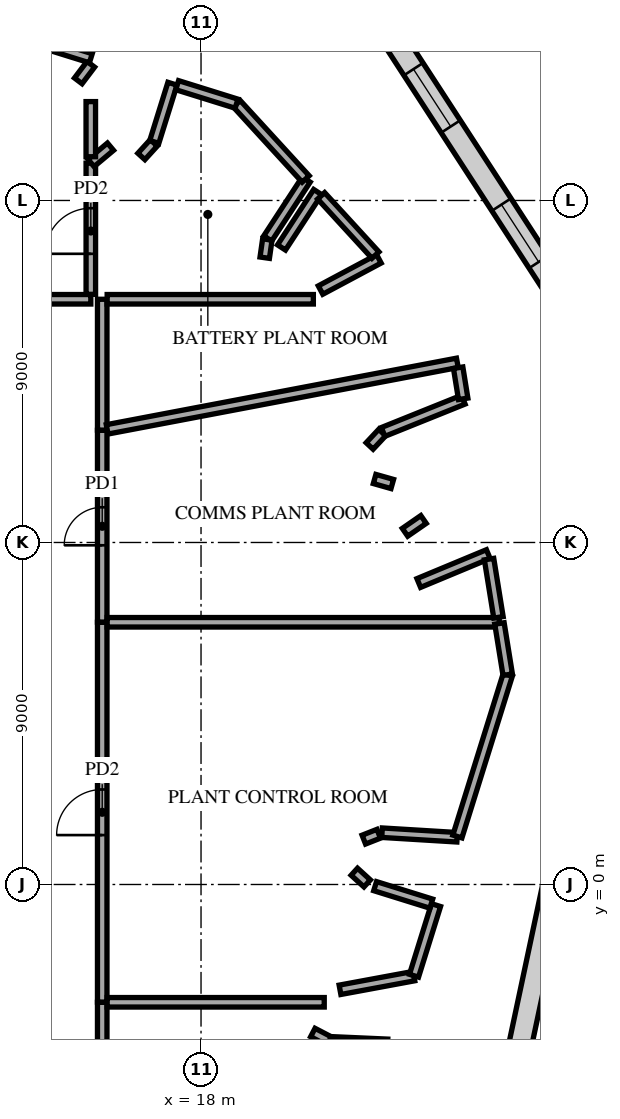
"""IFC4 building model, lengths in metres.
Left out: names, types, materials, properties, quantities, classifications, styles, units other than length and angle.
Written with IfcOpenShell. Run it as: python <this file> out.ifc"""

import sys

from ifc_helpers import new_model, si_unit, direction, frame, frame_2d, origin, place, context, subcontext, project, spatial, rectangle, extrude, element, fill, save


model = new_model("IFC4")
c1 = context("Model", 3, precision=1e-05, world=origin(), true_north=direction((0.0, 1.0)))
c2 = subcontext(c1, "Body", "Model", "MODEL_VIEW")
j1 = project(units=[si_unit("LENGTHUNIT", "METRE"), si_unit("PLANEANGLEUNIT", "RADIAN")], contexts=[c1])
p1 = place(None, origin())
s1 = spatial("IfcSite", under=j1, at=p1, CompositionType="ELEMENT")
p2 = place(p1, origin())
s2 = spatial("IfcBuilding", under=s1, at=p2, CompositionType="ELEMENT")
p3 = place(p2, frame((0.0, 0.0, 344.5)))
s3 = spatial("IfcBuildingStorey", under=s2, at=p3, CompositionType="ELEMENT", Elevation=344.5)
p4 = place(p3, frame((15.4, -13.095, 0.0), z_axis=(0.0, 0.0, 1.0), x_axis=(0.0, 1.0, 0.0)))
e1 = element("IfcWall", 1, at=p4, inside=s3, PredefinedType="PARTITIONING", context=c2, shape_type="SweptSolid", body=[
    extrude(rectangle(XDim=9.995, YDim=0.25, at=frame_2d((4.998, 0.0))), origin(), (0.0, 0.0, 1.0), 5.3),
])
p5 = place(p4, frame((4.395, 0.0, 0.0)))
e2 = element("IfcOpeningElement", 2, at=p5, cuts=e1, PredefinedType="OPENING", context=c2, shape_type="SweptSolid", body=[
    extrude(rectangle(XDim=1.2, YDim=2.1, at=frame_2d((0.6, 1.05))), frame((0.0, 0.135, 0.0), z_axis=(0.0, -1.0, 0.0), x_axis=(1.0, 0.0, 0.0)), (0.0, 0.0, 1.0), 0.27),
])
p6 = place(p3, frame((21.399, -4.127, 0.0), z_axis=(0.0, 0.0, 1.0), x_axis=(0.999019848314, -0.044264462878, 0.0)))
e3 = element("IfcWall", 3, at=p6, inside=s3, PredefinedType="PARTITIONING", context=c2, shape_type="SweptSolid", body=[
    extrude(rectangle(XDim=1.511, YDim=0.25, at=frame_2d((0.756, 0.0))), origin(), (0.0, 0.0, 1.0), 5.3),
])
p7 = place(p3, frame((20.942, -3.896, 0.0), z_axis=(0.0, 0.0, 1.0), x_axis=(0.886728784224, -0.462290020688, 0.0)))
e4 = element("IfcWall", 4, at=p7, inside=s3, PredefinedType="PARTITIONING", context=c2, shape_type="SweptSolid", body=[
    extrude(rectangle(XDim=0.484, YDim=0.25, at=frame_2d((0.242, 0.0))), origin(), (0.0, 0.0, 1.0), 5.3),
])
p8 = place(p3, frame((15.4, -3.095, 0.0), z_axis=(0.0, 0.0, 1.0), x_axis=(0.0, 1.0, 0.0)))
e5 = element("IfcWall", 5, at=p8, inside=s3, PredefinedType="PARTITIONING", context=c2, shape_type="SweptSolid", body=[
    extrude(rectangle(XDim=9.995, YDim=0.25, at=frame_2d((4.998, 0.0))), origin(), (0.0, 0.0, 1.0), 5.3),
])
p9 = place(p8, frame((4.395, 0.0, 0.0)))
e6 = element("IfcOpeningElement", 6, at=p9, cuts=e5, PredefinedType="OPENING", context=c2, shape_type="SweptSolid", body=[
    extrude(rectangle(XDim=1.2, YDim=2.1, at=frame_2d((0.6, 1.05))), frame((0.0, 0.135, 0.0), z_axis=(0.0, -1.0, 0.0), x_axis=(1.0, 0.0, 0.0)), (0.0, 0.0, 1.0), 0.27),
])
p10 = place(p3, frame((15.53, -3.1, 0.0), z_axis=(0.0, 0.0, 1.0), x_axis=(1.0, 0.0, 0.0)))
e7 = element("IfcWall", 7, at=p10, inside=s3, PredefinedType="PARTITIONING", context=c2, shape_type="SweptSolid", body=[
    extrude(rectangle(XDim=5.712, YDim=0.25, at=frame_2d((2.856, 0.0))), origin(), (0.0, 0.0, 1.0), 4.466),
])
p11 = place(p3, frame((21.657, -2.771, 0.0), z_axis=(0.0, 0.0, 1.0), x_axis=(0.98324759297, 0.182274987092, 0.0)))
e8 = element("IfcWall", 8, at=p11, inside=s3, PredefinedType="PARTITIONING", context=c2, shape_type="SweptSolid", body=[
    extrude(rectangle(XDim=1.977, YDim=0.25, at=frame_2d((0.989, 0.0))), origin(), (0.0, 0.0, 1.0), 5.3),
])
p12 = place(p3, frame((23.604, -2.401, 0.0), z_axis=(0.0, 0.0, 1.0), x_axis=(0.297539238937, 0.954709590029, 0.0)))
e9 = element("IfcWall", 9, at=p12, inside=s3, PredefinedType="PARTITIONING", context=c2, shape_type="SweptSolid", body=[
    extrude(rectangle(XDim=1.946, YDim=0.25, at=frame_2d((0.973, 0.0))), origin(), (0.0, 0.0, 1.0), 5.3),
])
p13 = place(p3, frame((22.581, -0.044, 0.0), z_axis=(0.0, 0.0, 1.0), x_axis=(0.95474338111, -0.297430792331, 0.0)))
e10 = element("IfcWall", 10, at=p13, inside=s3, PredefinedType="PARTITIONING", context=c2, shape_type="SweptSolid", body=[
    extrude(rectangle(XDim=1.548, YDim=0.25, at=frame_2d((0.774, 0.0))), origin(), (0.0, 0.0, 1.0), 5.3),
])
p14 = place(p3, frame((22.034, 0.336, 0.0), z_axis=(0.0, 0.0, 1.0), x_axis=(0.739480209933, -0.673178296678, 0.0)))
e11 = element("IfcWall", 11, at=p14, inside=s3, PredefinedType="PARTITIONING", context=c2, shape_type="SweptSolid", body=[
    extrude(rectangle(XDim=0.457, YDim=0.25, at=frame_2d((0.228, 0.0))), origin(), (0.0, 0.0, 1.0), 5.3),
])
p15 = place(p3, frame((22.763, 1.363, 0.0), z_axis=(0.0, 0.0, 1.0), x_axis=(0.998159010361, -0.060651381141, 0.0)))
e12 = element("IfcWall", 12, at=p15, inside=s3, PredefinedType="PARTITIONING", context=c2, shape_type="SweptSolid", body=[
    extrude(rectangle(XDim=1.98, YDim=0.25, at=frame_2d((0.99, 0.0))), origin(), (0.0, 0.0, 1.0), 5.3),
])
p16 = place(p3, frame((22.284, 1.181, 0.0), z_axis=(0.0, 0.0, 1.0), x_axis=(0.930306402857, 0.366783310421, 0.0)))
e13 = element("IfcWall", 13, at=p16, inside=s3, PredefinedType="PARTITIONING", context=c2, shape_type="SweptSolid", body=[
    extrude(rectangle(XDim=0.421, YDim=0.25, at=frame_2d((0.21, 0.0))), origin(), (0.0, 0.0, 1.0), 5.3),
])
p17 = place(p3, frame((24.746, 1.263, 0.0), z_axis=(0.0, 0.0, 1.0), x_axis=(0.297504056883, 0.954720553952, 0.0)))
e14 = element("IfcWall", 14, at=p17, inside=s3, PredefinedType="PARTITIONING", context=c2, shape_type="SweptSolid", body=[
    extrude(rectangle(XDim=4.454, YDim=0.25, at=frame_2d((2.227, 0.0))), origin(), (0.0, 0.0, 1.0), 5.3),
])
p18 = place(p3, frame((15.4, 6.905, 0.0), z_axis=(0.0, 0.0, 1.0), x_axis=(0.0, 1.0, 0.0)))
e15 = element("IfcWall", 15, at=p18, inside=s3, PredefinedType="PARTITIONING", context=c2, shape_type="SweptSolid", body=[
    extrude(rectangle(XDim=5.047, YDim=0.25, at=frame_2d((2.523, 0.0))), origin(), (0.0, 0.0, 1.0), 5.3),
])
p19 = place(p18, frame((2.021, 0.0, 0.0)))
e16 = element("IfcOpeningElement", 16, at=p19, cuts=e15, PredefinedType="OPENING", context=c2, shape_type="SweptSolid", body=[
    extrude(rectangle(XDim=1.0, YDim=2.1, at=frame_2d((0.5, 1.05))), frame((0.0, 0.135, 0.0), z_axis=(0.0, -1.0, 0.0), x_axis=(1.0, 0.0, 0.0)), (0.0, 0.0, 1.0), 0.27),
])
p20 = place(p3, frame((15.53, 6.9, 0.0), z_axis=(0.0, 0.0, 1.0), x_axis=(1.0, 0.0, 0.0)))
e17 = element("IfcWall", 17, at=p20, inside=s3, PredefinedType="PARTITIONING", context=c2, shape_type="SweptSolid", body=[
    extrude(rectangle(XDim=10.317, YDim=0.25, at=frame_2d((5.159, 0.0))), origin(), (0.0, 0.0, 1.0), 4.466),
])
p21 = place(p3, frame((25.852, 6.869, 0.0), z_axis=(0.0, 0.0, 1.0), x_axis=(0.159468506088, -0.987203016388, 0.0)))
e18 = element("IfcWall", 18, at=p21, inside=s3, PredefinedType="PARTITIONING", context=c2, shape_type="SweptSolid", body=[
    extrude(rectangle(XDim=1.366, YDim=0.25, at=frame_2d((0.683, 0.0))), origin(), (0.0, 0.0, 1.0), 5.3),
])
p22 = place(p3, frame((23.729, 7.933, 0.0), z_axis=(0.0, 0.0, 1.0), x_axis=(0.923226391298, 0.384256464371, 0.0)))
e19 = element("IfcWall", 19, at=p22, inside=s3, PredefinedType="PARTITIONING", context=c2, shape_type="SweptSolid", body=[
    extrude(rectangle(XDim=1.98, YDim=0.25, at=frame_2d((0.99, 0.0))), origin(), (0.0, 0.0, 1.0), 5.3),
])
p23 = place(p3, frame((25.579, 8.562, 0.0), z_axis=(0.0, 0.0, 1.0), x_axis=(0.159346186049, -0.987222767663, 0.0)))
e20 = element("IfcWall", 20, at=p23, inside=s3, PredefinedType="PARTITIONING", context=c2, shape_type="SweptSolid", body=[
    extrude(rectangle(XDim=1.552, YDim=0.25, at=frame_2d((0.776, 0.0))), origin(), (0.0, 0.0, 1.0), 5.3),
])
p24 = place(p3, frame((23.367, 9.268, 0.0), z_axis=(0.0, 0.0, 1.0), x_axis=(0.822355310526, 0.568974290499, 0.0)))
e21 = element("IfcWall", 21, at=p24, inside=s3, PredefinedType="PARTITIONING", context=c2, shape_type="SweptSolid", body=[
    extrude(rectangle(XDim=0.593, YDim=0.25, at=frame_2d((0.296, 0.0))), origin(), (0.0, 0.0, 1.0), 5.3),
])
p25 = place(p3, frame((22.567, 10.671, 0.0), z_axis=(0.0, 0.0, 1.0), x_axis=(0.961998655506, -0.273054182911, 0.0)))
e22 = element("IfcWall", 22, at=p25, inside=s3, PredefinedType="PARTITIONING", context=c2, shape_type="SweptSolid", body=[
    extrude(rectangle(XDim=0.484, YDim=0.25, at=frame_2d((0.242, 0.0))), origin(), (0.0, 0.0, 1.0), 5.3),
])
p26 = place(p3, frame((22.437, 11.539, 0.0), z_axis=(0.0, 0.0, 1.0), x_axis=(0.683252613889, 0.730182077029, 0.0)))
e23 = element("IfcWall", 23, at=p26, inside=s3, PredefinedType="PARTITIONING", context=c2, shape_type="SweptSolid", body=[
    extrude(rectangle(XDim=0.484, YDim=0.25, at=frame_2d((0.242, 0.0))), origin(), (0.0, 0.0, 1.0), 5.3),
])
p27 = place(p3, frame((15.4, 11.957, 0.0), z_axis=(0.0, 0.0, 1.0), x_axis=(0.0, 1.0, 0.0)))
e24 = element("IfcWall", 24, at=p27, inside=s3, PredefinedType="PARTITIONING", context=c2, shape_type="SweptSolid", body=[
    extrude(rectangle(XDim=3.443, YDim=0.25, at=frame_2d((1.721, 0.0))), origin(), (0.0, 0.0, 1.0), 4.56),
])
p28 = place(p3, frame((15.53, 11.977, 0.0), z_axis=(0.0, 0.0, 1.0), x_axis=(0.982431849139, 0.186621707732, 0.0)))
e25 = element("IfcWall", 25, at=p28, inside=s3, PredefinedType="PARTITIONING", context=c2, shape_type="SweptSolid", body=[
    extrude(rectangle(XDim=9.38, YDim=0.25, at=frame_2d((4.69, 0.0))), origin(), (0.0, 0.0, 1.0), 4.466),
])
p29 = place(p3, frame((22.792, 11.909, 0.0), z_axis=(0.0, 0.0, 1.0), x_axis=(0.927742008142, 0.373222140728, 0.0)))
e26 = element("IfcWall", 26, at=p29, inside=s3, PredefinedType="PARTITIONING", context=c2, shape_type="SweptSolid", body=[
    extrude(rectangle(XDim=2.274, YDim=0.25, at=frame_2d((1.137, 0.0))), origin(), (0.0, 0.0, 1.0), 5.3),
])
p30 = place(p3, frame((24.766, 13.599, 0.0), z_axis=(0.0, 0.0, 1.0), x_axis=(0.159528555864, -0.987193314333, 0.0)))
e27 = element("IfcWall", 27, at=p30, inside=s3, PredefinedType="PARTITIONING", context=c2, shape_type="SweptSolid", body=[
    extrude(rectangle(XDim=0.83, YDim=0.25, at=frame_2d((0.415, 0.0))), origin(), (0.0, 0.0, 1.0), 5.3),
])
p31 = place(p3, frame((5.105, 15.4, 0.0), z_axis=(0.0, 0.0, 1.0), x_axis=(1.0, 0.0, 0.0)))
e28 = element("IfcWall", 28, at=p31, inside=s3, PredefinedType="PARTITIONING", context=c2, shape_type="SweptSolid", body=[
    extrude(rectangle(XDim=9.995, YDim=0.25, at=frame_2d((4.998, 0.0))), origin(), (0.0, 0.0, 1.0), 5.3),
])
p32 = place(p31, frame((4.395, 0.0, 0.0)))
e29 = element("IfcOpeningElement", 29, at=p32, cuts=e28, PredefinedType="OPENING", context=c2, shape_type="SweptSolid", body=[
    extrude(rectangle(XDim=1.2, YDim=2.1, at=frame_2d((0.6, 1.05))), frame((0.0, 0.135, 0.0), z_axis=(0.0, -1.0, 0.0), x_axis=(1.0, 0.0, 0.0)), (0.0, 0.0, 1.0), 0.27),
])
p33 = place(p3, frame((15.1, 15.53, 0.0), z_axis=(0.0, 0.0, 1.0), x_axis=(0.0, 1.0, 0.0)))
e30 = element("IfcWall", 30, at=p33, inside=s3, PredefinedType="PARTITIONING", context=c2, shape_type="SweptSolid", body=[
    extrude(rectangle(XDim=3.452, YDim=0.25, at=frame_2d((1.726, 0.0))), origin(), (0.0, 0.0, 1.0), 4.466),
])
p34 = place(p33, frame((1.066, 0.0, 0.0)))
e31 = element("IfcOpeningElement", 31, at=p34, cuts=e30, PredefinedType="OPENING", context=c2, shape_type="SweptSolid", body=[
    extrude(rectangle(XDim=1.2, YDim=2.1, at=frame_2d((0.6, 1.05))), frame((0.0, 0.135, 0.0), z_axis=(0.0, -1.0, 0.0), x_axis=(1.0, 0.0, 0.0)), (0.0, 0.0, 1.0), 0.27),
])
p35 = place(p3, frame((15.53, 15.4, 0.0), z_axis=(0.0, 0.0, 1.0), x_axis=(1.0, 0.0, 0.0)))
e32 = element("IfcWall", 32, at=p35, inside=s3, PredefinedType="PARTITIONING", context=c2, shape_type="SweptSolid", body=[
    extrude(rectangle(XDim=5.426, YDim=0.25, at=frame_2d((2.713, 0.0))), origin(), (0.0, 0.0, 1.0), 4.466),
])
p36 = place(p3, frame((21.145, 15.642, 0.0), z_axis=(0.0, 0.0, 1.0), x_axis=(0.8818361721, 0.471555898676, 0.0)))
e33 = element("IfcWall", 33, at=p36, inside=s3, PredefinedType="PARTITIONING", context=c2, shape_type="SweptSolid", body=[
    extrude(rectangle(XDim=1.741, YDim=0.25, at=frame_2d((0.871, 0.0))), origin(), (0.0, 0.0, 1.0), 5.3),
])
p37 = place(p3, frame((20.117, 16.763, 0.0), z_axis=(0.0, 0.0, 1.0), x_axis=(0.546780877777, 0.837275744124, 0.0)))
e34 = element("IfcWall", 34, at=p37, inside=s3, PredefinedType="PARTITIONING", context=c2, shape_type="SweptSolid", body=[
    extrude(rectangle(XDim=1.741, YDim=0.25, at=frame_2d((0.871, 0.0))), origin(), (0.0, 0.0, 1.0), 5.3),
])
p38 = place(p3, frame((19.676, 16.494, 0.0), z_axis=(0.0, 0.0, 1.0), x_axis=(0.141774522204, 0.989898977095, 0.0)))
e35 = element("IfcWall", 35, at=p38, inside=s3, PredefinedType="PARTITIONING", context=c2, shape_type="SweptSolid", body=[
    extrude(rectangle(XDim=0.484, YDim=0.25, at=frame_2d((0.242, 0.0))), origin(), (0.0, 0.0, 1.0), 5.3),
])
p39 = place(p3, frame((21.16, 18.123, 0.0), z_axis=(0.0, 0.0, 1.0), x_axis=(0.675515657464, -0.737345642505, 0.0)))
e36 = element("IfcWall", 36, at=p39, inside=s3, PredefinedType="PARTITIONING", context=c2, shape_type="SweptSolid", body=[
    extrude(rectangle(XDim=2.116, YDim=0.25, at=frame_2d((1.058, 0.0))), origin(), (0.0, 0.0, 1.0), 5.3),
])
p40 = place(p3, frame((19.755, 17.0, 0.0), z_axis=(0.0, 0.0, 1.0), x_axis=(0.546766270991, 0.837285282868, 0.0)))
e37 = element("IfcWall", 37, at=p40, inside=s3, PredefinedType="PARTITIONING", context=c2, shape_type="SweptSolid", body=[
    extrude(rectangle(XDim=1.852, YDim=0.25, at=frame_2d((0.926, 0.0))), origin(), (0.0, 0.0, 1.0), 5.3),
])
p41 = place(p3, frame((15.106, 18.987, 0.0), z_axis=(0.0, 0.0, 1.0), x_axis=(0.767050686125, 0.641586506182, 0.0)))
e38 = element("IfcWall", 38, at=p41, inside=s3, PredefinedType="PARTITIONING", context=c2, shape_type="SweptSolid", body=[
    extrude(rectangle(XDim=0.667, YDim=0.25, at=frame_2d((0.334, 0.0))), origin(), (0.0, 0.0, 1.0), 5.3),
])
p42 = place(p3, frame((16.431, 19.158, 0.0), z_axis=(0.0, 0.0, 1.0), x_axis=(0.672999412764, 0.739643015528, 0.0)))
e39 = element("IfcWall", 39, at=p42, inside=s3, PredefinedType="PARTITIONING", context=c2, shape_type="SweptSolid", body=[
    extrude(rectangle(XDim=0.484, YDim=0.25, at=frame_2d((0.242, 0.0))), origin(), (0.0, 0.0, 1.0), 5.3),
])
p43 = place(p3, frame((16.771, 19.541, 0.0), z_axis=(0.0, 0.0, 1.0), x_axis=(0.297538309399, 0.954709879723, 0.0)))
e40 = element("IfcWall", 40, at=p43, inside=s3, PredefinedType="PARTITIONING", context=c2, shape_type="SweptSolid", body=[
    extrude(rectangle(XDim=1.604, YDim=0.25, at=frame_2d((0.802, 0.0))), origin(), (0.0, 0.0, 1.0), 5.3),
])
p44 = place(p3, frame((18.94, 20.545, 0.0), z_axis=(0.0, 0.0, 1.0), x_axis=(0.675510459463, -0.737350404595, 0.0)))
e41 = element("IfcWall", 41, at=p44, inside=s3, PredefinedType="PARTITIONING", context=c2, shape_type="SweptSolid", body=[
    extrude(rectangle(XDim=2.685, YDim=0.25, at=frame_2d((1.342, 0.0))), origin(), (0.0, 0.0, 1.0), 5.3),
])
p45 = place(p3, frame((15.099, 20.602, 0.0), z_axis=(0.0, 0.0, 1.0), x_axis=(0.000168265184, -0.999999985843, 0.0)))
e42 = element("IfcWall", 42, at=p45, inside=s3, PredefinedType="PARTITIONING", context=c2, shape_type="SweptSolid", body=[
    extrude(rectangle(XDim=1.451, YDim=0.25, at=frame_2d((0.726, 0.0))), origin(), (0.0, 0.0, 1.0), 5.3),
])
p46 = place(p3, frame((17.372, 21.034, 0.0), z_axis=(0.0, 0.0, 1.0), x_axis=(0.954705286895, -0.297553045986, 0.0)))
e43 = element("IfcWall", 43, at=p46, inside=s3, PredefinedType="PARTITIONING", context=c2, shape_type="SweptSolid", body=[
    extrude(rectangle(XDim=1.637, YDim=0.25, at=frame_2d((0.818, 0.0))), origin(), (0.0, 0.0, 1.0), 5.3),
])
p47 = place(p3, frame((14.77, 21.147, 0.0), z_axis=(0.0, 0.0, 1.0), x_axis=(0.602921405865, 0.797800588086, 0.0)))
e44 = element("IfcWall", 44, at=p47, inside=s3, PredefinedType="PARTITIONING", context=c2, shape_type="SweptSolid", body=[
    extrude(rectangle(XDim=0.547, YDim=0.25, at=frame_2d((0.274, 0.0))), origin(), (0.0, 0.0, 1.0), 5.3),
])
p48 = place(p3, frame((13.36, 22.284, 0.0), z_axis=(0.0, 0.0, 1.0), x_axis=(0.954741847681, -0.297435714545, 0.0)))
e45 = element("IfcWall", 45, at=p48, inside=s3, PredefinedType="PARTITIONING", context=c2, shape_type="SweptSolid", body=[
    extrude(rectangle(XDim=1.822, YDim=0.25, at=frame_2d((0.911, 0.0))), origin(), (0.0, 0.0, 1.0), 5.3),
])
p49 = place(p3, frame((21.129, -29.017, 0.0), z_axis=(0.0, 0.0, 1.0), x_axis=(0.207910119568, 0.978147934712, 0.0)))
e46 = element("IfcWall", 46, at=p49, inside=s3, PredefinedType="STANDARD", context=c2, shape_type="SweptSolid", body=[
    extrude(rectangle(XDim=47.979, YDim=0.6, at=frame_2d((23.99, 0.0))), origin(), (0.0, 0.0, 1.0), 5.3),
])
p50 = place(p49, frame((1.231, 0.0, 0.6)))
e47 = element("IfcOpeningElement", 47, at=p50, cuts=e46, PredefinedType="OPENING", context=c2, shape_type="SweptSolid", body=[
    extrude(rectangle(XDim=1.9, YDim=4.25, at=frame_2d((0.95, 2.125))), frame((0.0, 0.31, 0.0), z_axis=(0.0, -1.0, 0.0), x_axis=(1.0, 0.0, 0.0)), (0.0, 0.0, 1.0), 0.62),
])
p51 = place(p49, frame((5.593, 0.0, 0.6)))
e48 = element("IfcOpeningElement", 48, at=p51, cuts=e46, PredefinedType="OPENING", context=c2, shape_type="SweptSolid", body=[
    extrude(rectangle(XDim=1.9, YDim=4.25, at=frame_2d((0.95, 2.125))), frame((0.0, 0.31, 0.0), z_axis=(0.0, -1.0, 0.0), x_axis=(1.0, 0.0, 0.0)), (0.0, 0.0, 1.0), 0.62),
])
p52 = place(p49, frame((9.954, 0.0, 0.6)))
e49 = element("IfcOpeningElement", 49, at=p52, cuts=e46, PredefinedType="OPENING", context=c2, shape_type="SweptSolid", body=[
    extrude(rectangle(XDim=1.9, YDim=4.25, at=frame_2d((0.95, 2.125))), frame((0.0, 0.31, 0.0), z_axis=(0.0, -1.0, 0.0), x_axis=(1.0, 0.0, 0.0)), (0.0, 0.0, 1.0), 0.62),
])
p53 = place(p49, frame((14.316, 0.0, 0.6)))
e50 = element("IfcOpeningElement", 50, at=p53, cuts=e46, PredefinedType="OPENING", context=c2, shape_type="SweptSolid", body=[
    extrude(rectangle(XDim=1.9, YDim=4.25, at=frame_2d((0.95, 2.125))), frame((0.0, 0.31, 0.0), z_axis=(0.0, -1.0, 0.0), x_axis=(1.0, 0.0, 0.0)), (0.0, 0.0, 1.0), 0.62),
])
p54 = place(p49, frame((18.678, 0.0, 0.6)))
e51 = element("IfcOpeningElement", 51, at=p54, cuts=e46, PredefinedType="OPENING", context=c2, shape_type="SweptSolid", body=[
    extrude(rectangle(XDim=1.9, YDim=4.25, at=frame_2d((0.95, 2.125))), frame((0.0, 0.31, 0.0), z_axis=(0.0, -1.0, 0.0), x_axis=(1.0, 0.0, 0.0)), (0.0, 0.0, 1.0), 0.62),
])
p55 = place(p49, frame((23.04, 0.0, 0.6)))
e52 = element("IfcOpeningElement", 52, at=p55, cuts=e46, PredefinedType="OPENING", context=c2, shape_type="SweptSolid", body=[
    extrude(rectangle(XDim=1.9, YDim=4.25, at=frame_2d((0.95, 2.125))), frame((0.0, 0.31, 0.0), z_axis=(0.0, -1.0, 0.0), x_axis=(1.0, 0.0, 0.0)), (0.0, 0.0, 1.0), 0.62),
])
p56 = place(p49, frame((31.763, 0.0, 0.6)))
e53 = element("IfcOpeningElement", 53, at=p56, cuts=e46, PredefinedType="OPENING", context=c2, shape_type="SweptSolid", body=[
    extrude(rectangle(XDim=1.9, YDim=4.25, at=frame_2d((0.95, 2.125))), frame((0.0, 0.31, 0.0), z_axis=(0.0, -1.0, 0.0), x_axis=(1.0, 0.0, 0.0)), (0.0, 0.0, 1.0), 0.62),
])
p57 = place(p49, frame((36.125, 0.0, 0.6)))
e54 = element("IfcOpeningElement", 54, at=p57, cuts=e46, PredefinedType="OPENING", context=c2, shape_type="SweptSolid", body=[
    extrude(rectangle(XDim=1.9, YDim=4.25, at=frame_2d((0.95, 2.125))), frame((0.0, 0.31, 0.0), z_axis=(0.0, -1.0, 0.0), x_axis=(1.0, 0.0, 0.0)), (0.0, 0.0, 1.0), 0.62),
])
p58 = place(p49, frame((40.487, 0.0, 0.6)))
e55 = element("IfcOpeningElement", 55, at=p58, cuts=e46, PredefinedType="OPENING", context=c2, shape_type="SweptSolid", body=[
    extrude(rectangle(XDim=1.9, YDim=4.25, at=frame_2d((0.95, 2.125))), frame((0.0, 0.31, 0.0), z_axis=(0.0, -1.0, 0.0), x_axis=(1.0, 0.0, 0.0)), (0.0, 0.0, 1.0), 0.62),
])
p59 = place(p49, frame((44.848, 0.0, 0.6)))
e56 = element("IfcOpeningElement", 56, at=p59, cuts=e46, PredefinedType="OPENING", context=c2, shape_type="SweptSolid", body=[
    extrude(rectangle(XDim=1.9, YDim=4.25, at=frame_2d((0.95, 2.125))), frame((0.0, 0.31, 0.0), z_axis=(0.0, -1.0, 0.0), x_axis=(1.0, 0.0, 0.0)), (0.0, 0.0, 1.0), 0.62),
])
p60 = place(p3, frame((27.552, 15.354, 0.0), z_axis=(0.0, 0.0, 1.0), x_axis=(-0.544637978142, 0.838671254286, 0.0)))
e57 = element("IfcWall", 57, at=p60, inside=s3, PredefinedType="STANDARD", context=c2, shape_type="SweptSolid", body=[
    extrude(rectangle(XDim=8.5, YDim=0.6, at=frame_2d((4.25, 0.0))), origin(), (0.0, 0.0, 1.0), 5.3),
])
p61 = place(p60, frame((1.225, 0.0, 0.6)))
e58 = element("IfcOpeningElement", 58, at=p61, cuts=e57, PredefinedType="OPENING", context=c2, shape_type="SweptSolid", body=[
    extrude(rectangle(XDim=1.8, YDim=4.25, at=frame_2d((0.9, 2.125))), frame((0.0, 0.31, 0.0), z_axis=(0.0, -1.0, 0.0), x_axis=(1.0, 0.0, 0.0)), (0.0, 0.0, 1.0), 0.62),
])
p62 = place(p60, frame((5.475, 0.0, 0.6)))
e59 = element("IfcOpeningElement", 59, at=p62, cuts=e57, PredefinedType="OPENING", context=c2, shape_type="SweptSolid", body=[
    extrude(rectangle(XDim=1.8, YDim=4.25, at=frame_2d((0.9, 2.125))), frame((0.0, 0.31, 0.0), z_axis=(0.0, -1.0, 0.0), x_axis=(1.0, 0.0, 0.0)), (0.0, 0.0, 1.0), 0.62),
])
p63 = place(p19, origin())
e60 = element("IfcDoor", 60, at=p63, inside=s3, OperationType="SINGLE_SWING_LEFT", PredefinedType="DOOR", context=c2, shape_type="SweptSolid", body=[
    extrude(rectangle(XDim=1.0, YDim=2.1, at=frame_2d((0.5, 1.05))), frame((0.0, 0.025, 0.0), z_axis=(0.0, -1.0, 0.0), x_axis=(1.0, 0.0, 0.0)), (0.0, 0.0, 1.0), 0.05),
])
fill(e16, e60)
p64 = place(p9, origin())
e61 = element("IfcDoor", 61, at=p64, inside=s3, OperationType="SINGLE_SWING_RIGHT", PredefinedType="DOOR", context=c2, shape_type="SweptSolid", body=[
    extrude(rectangle(XDim=1.2, YDim=2.1, at=frame_2d((0.6, 1.05))), frame((0.0, 0.025, 0.0), z_axis=(0.0, -1.0, 0.0), x_axis=(1.0, 0.0, 0.0)), (0.0, 0.0, 1.0), 0.05),
])
fill(e6, e61)
p65 = place(p34, origin())
e62 = element("IfcDoor", 62, at=p65, inside=s3, OperationType="SINGLE_SWING_LEFT", PredefinedType="DOOR", context=c2, shape_type="SweptSolid", body=[
    extrude(rectangle(XDim=1.2, YDim=2.1, at=frame_2d((0.6, 1.05))), frame((0.0, 0.025, 0.0), z_axis=(0.0, -1.0, 0.0), x_axis=(1.0, 0.0, 0.0)), (0.0, 0.0, 1.0), 0.05),
])
fill(e31, e62)
p66 = place(p61, origin())
e63 = element("IfcWindow", 63, at=p66, inside=s3, PartitioningType="SINGLE_PANEL", PredefinedType="USERDEFINED", context=c2, shape_type="SweptSolid", body=[
    extrude(rectangle(XDim=1.8, YDim=4.25, at=frame_2d((0.9, 2.125))), frame((0.0, 0.03, 0.0), z_axis=(0.0, -1.0, 0.0), x_axis=(1.0, 0.0, 0.0)), (0.0, 0.0, 1.0), 0.06),
])
fill(e58, e63)
p67 = place(p62, origin())
e64 = element("IfcWindow", 64, at=p67, inside=s3, PartitioningType="SINGLE_PANEL", PredefinedType="USERDEFINED", context=c2, shape_type="SweptSolid", body=[
    extrude(rectangle(XDim=1.8, YDim=4.25, at=frame_2d((0.9, 2.125))), frame((0.0, 0.03, 0.0), z_axis=(0.0, -1.0, 0.0), x_axis=(1.0, 0.0, 0.0)), (0.0, 0.0, 1.0), 0.06),
])
fill(e59, e64)
save(model, sys.argv[1])
